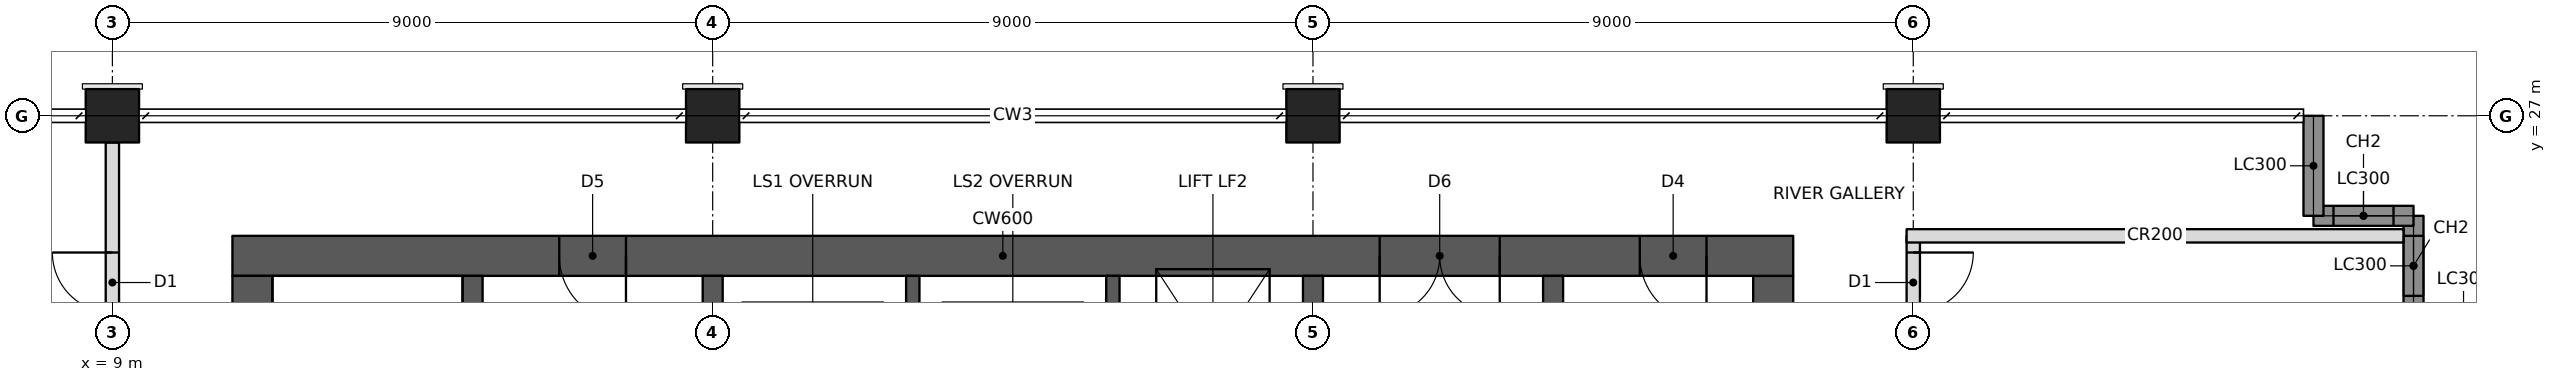
"""IFC4 building model, lengths in metres.
Left out: names, types, materials, properties, quantities, classifications, styles, units other than length and angle.
Written with IfcOpenShell. Run it as: python <this file> out.ifc"""

import sys

from ifc_helpers import new_model, si_unit, direction, frame, frame_2d, origin, origin_2d, place, context, subcontext, project, spatial, rectangle, hollow_rectangle, extrude, element, fill, save


model = new_model("IFC4")
c1 = context("Model", 3, precision=1e-05, world=origin(), true_north=direction((0.0, 1.0)))
c2 = subcontext(c1, "Body", "Model", "MODEL_VIEW")
j1 = project(units=[si_unit("LENGTHUNIT", "METRE"), si_unit("PLANEANGLEUNIT", "RADIAN")], contexts=[c1])
p1 = place(None, origin())
s1 = spatial("IfcSite", under=j1, at=p1, CompositionType="ELEMENT")
p2 = place(p1, origin())
s2 = spatial("IfcBuilding", under=s1, at=p2, CompositionType="ELEMENT")
p3 = place(p2, frame((0.0, 0.0, 163.8)))
s3 = spatial("IfcBuildingStorey", under=s2, at=p3, CompositionType="ELEMENT", Elevation=163.8)
for number, where, z_axis, x_axis in (
    (1, (9.0, 27.0, 0.0), (0.0, 0.0, 1.0), (1.0, 0.0, 0.0)),
    (2, (18.0, 27.0, 0.0), (0.0, 0.0, 1.0), (1.0, 0.0, 0.0)),
    (3, (27.0, 27.0, 0.0), (0.0, 0.0, 1.0), (1.0, 0.0, 0.0)),
    (4, (36.0, 27.0, 0.0), (0.0, 0.0, 1.0), (1.0, 0.0, 0.0)),
):
    element("IfcColumn", number, at=place(p3, frame(where, z_axis=z_axis, x_axis=x_axis)), inside=s3, PredefinedType="COLUMN", context=c2, shape_type="SweptSolid", body=[
        extrude(hollow_rectangle(XDim=0.8, YDim=0.8, WallThickness=0.07, at=origin_2d()), origin(), (0.0, 0.0, 1.0), 3.4),
    ])
p4 = place(p3, frame((10.8, 24.9, 0.0), z_axis=(0.0, 0.0, 1.0), x_axis=(1.0, 0.0, 0.0)))
e5 = element("IfcWall", 5, at=p4, inside=s3, PredefinedType="SHEAR", context=c2, shape_type="SweptSolid", body=[
    extrude(rectangle(XDim=23.4, YDim=0.6, at=frame_2d((11.7, 0.0))), origin(), (0.0, 0.0, 1.0), 3.4),
])
p5 = place(p4, frame((17.2, 0.0, 0.0)))
e6 = element("IfcOpeningElement", 6, at=p5, cuts=e5, PredefinedType="OPENING", context=c2, shape_type="SweptSolid", body=[
    extrude(rectangle(XDim=1.8, YDim=2.1, at=frame_2d((0.9, 1.05))), frame((0.0, 0.31, 0.0), z_axis=(0.0, -1.0, 0.0), x_axis=(1.0, 0.0, 0.0)), (0.0, 0.0, 1.0), 0.62),
])
p6 = place(p4, frame((21.1, 0.0, 0.0)))
e7 = element("IfcOpeningElement", 7, at=p6, cuts=e5, PredefinedType="OPENING", context=c2, shape_type="SweptSolid", body=[
    extrude(rectangle(XDim=1.0, YDim=2.1, at=frame_2d((0.5, 1.05))), frame((0.0, 0.31, 0.0), z_axis=(0.0, -1.0, 0.0), x_axis=(1.0, 0.0, 0.0)), (0.0, 0.0, 1.0), 0.62),
])
p7 = place(p4, frame((4.9, 0.0, 0.0)))
e8 = element("IfcOpeningElement", 8, at=p7, cuts=e5, PredefinedType="OPENING", context=c2, shape_type="SweptSolid", body=[
    extrude(rectangle(XDim=1.0, YDim=2.1, at=frame_2d((0.5, 1.05))), frame((0.0, 0.31, 0.0), z_axis=(0.0, -1.0, 0.0), x_axis=(1.0, 0.0, 0.0)), (0.0, 0.0, 1.0), 0.62),
])
for number, where, z_axis, x_axis in (
    (9, (11.1, 11.4, 0.0), (0.0, 0.0, 1.0), (0.0, 1.0, 0.0)),
    (10, (33.9, 11.4, 0.0), (0.0, 0.0, 1.0), (0.0, 1.0, 0.0)),
):
    element("IfcWall", number, at=place(p3, frame(where, z_axis=z_axis, x_axis=x_axis)), inside=s3, PredefinedType="SHEAR", context=c2, shape_type="SweptSolid", body=[
        extrude(rectangle(XDim=13.2, YDim=0.6, at=frame_2d((6.6, 0.0))), origin(), (0.0, 0.0, 1.0), 3.4),
    ])
p8 = place(p3, frame((14.4, 11.4, 0.0), z_axis=(0.0, 0.0, 1.0), x_axis=(0.0, 1.0, 0.0)))
e11 = element("IfcWall", 11, at=p8, inside=s3, PredefinedType="SHEAR", context=c2, shape_type="SweptSolid", body=[
    extrude(rectangle(XDim=13.2, YDim=0.3, at=frame_2d((6.6, 0.0))), origin(), (0.0, 0.0, 1.0), 3.4),
])
p9 = place(p3, frame((18.0, 11.4, 0.0), z_axis=(0.0, 0.0, 1.0), x_axis=(0.0, 1.0, 0.0)))
e12 = element("IfcWall", 12, at=p9, inside=s3, PredefinedType="SHEAR", context=c2, shape_type="SweptSolid", body=[
    extrude(rectangle(XDim=13.2, YDim=0.3, at=frame_2d((6.6, 0.0))), origin(), (0.0, 0.0, 1.0), 3.4),
])
p10 = place(p9, frame((3.6, 0.0, 0.0)))
e13 = element("IfcOpeningElement", 13, at=p10, cuts=e12, PredefinedType="OPENING", context=c2, shape_type="SweptSolid", body=[
    extrude(rectangle(XDim=1.0, YDim=2.1, at=frame_2d((0.5, 1.05))), frame((0.0, 0.16, 0.0), z_axis=(0.0, -1.0, 0.0), x_axis=(1.0, 0.0, 0.0)), (0.0, 0.0, 1.0), 0.32),
])
p11 = place(p9, frame((7.85, 0.0, 0.0)))
e14 = element("IfcOpeningElement", 14, at=p11, cuts=e12, PredefinedType="OPENING", context=c2, shape_type="SweptSolid", body=[
    extrude(rectangle(XDim=1.1, YDim=2.1, at=frame_2d((0.55, 1.05))), frame((0.0, 0.16, 0.0), z_axis=(0.0, -1.0, 0.0), x_axis=(1.0, 0.0, 0.0)), (0.0, 0.0, 1.0), 0.32),
])
p12 = place(p3, frame((27.0, 21.75, 0.0), z_axis=(0.0, 0.0, 1.0), x_axis=(0.0, 1.0, 0.0)))
e15 = element("IfcWall", 15, at=p12, inside=s3, PredefinedType="SHEAR", context=c2, shape_type="SweptSolid", body=[
    extrude(rectangle(XDim=2.85, YDim=0.3, at=frame_2d((1.425, 0.0))), origin(), (0.0, 0.0, 1.0), 3.4),
])
for number, where, z_axis, x_axis in (
    (16, (21.0, 21.75, 0.0), (0.0, 0.0, 1.0), (0.0, 1.0, 0.0)),
    (17, (24.0, 21.75, 0.0), (0.0, 0.0, 1.0), (0.0, 1.0, 0.0)),
):
    element("IfcWall", number, at=place(p3, frame(where, z_axis=z_axis, x_axis=x_axis)), inside=s3, PredefinedType="SHEAR", context=c2, shape_type="SweptSolid", body=[
        extrude(rectangle(XDim=2.85, YDim=0.2, at=frame_2d((1.425, 0.0))), origin(), (0.0, 0.0, 1.0), 3.4),
    ])
p13 = place(p3, frame((30.6, 11.4, 0.0), z_axis=(0.0, 0.0, 1.0), x_axis=(0.0, 1.0, 0.0)))
e18 = element("IfcWall", 18, at=p13, inside=s3, PredefinedType="SHEAR", context=c2, shape_type="SweptSolid", body=[
    extrude(rectangle(XDim=13.2, YDim=0.3, at=frame_2d((6.6, 0.0))), origin(), (0.0, 0.0, 1.0), 3.4),
])
p14 = place(p3, frame((43.5, 24.0, 0.0), z_axis=(0.0, 0.0, 1.0), x_axis=(0.0, 1.0, 0.0)))
e19 = element("IfcWall", 19, at=p14, inside=s3, PredefinedType="SOLIDWALL", context=c2, shape_type="SweptSolid", body=[
    extrude(rectangle(XDim=1.5, YDim=0.3, at=frame_2d((0.75, 0.0))), origin(), (0.0, 0.0, 1.0), 3.2),
])
p15 = place(p14, frame((0.3, 0.0, 0.6)))
e20 = element("IfcOpeningElement", 20, at=p15, cuts=e19, PredefinedType="OPENING", context=c2, shape_type="SweptSolid", body=[
    extrude(rectangle(XDim=0.9, YDim=2.2, at=frame_2d((0.45, 1.1))), frame((0.0, 0.16, 0.0), z_axis=(0.0, -1.0, 0.0), x_axis=(1.0, 0.0, 0.0)), (0.0, 0.0, 1.0), 0.32),
])
p16 = place(p3, frame((43.5, 25.5, 0.0), z_axis=(0.0, 0.0, 1.0), x_axis=(-1.0, 0.0, 0.0)))
e21 = element("IfcWall", 21, at=p16, inside=s3, PredefinedType="SOLIDWALL", context=c2, shape_type="SweptSolid", body=[
    extrude(rectangle(XDim=1.5, YDim=0.3, at=frame_2d((0.75, 0.0))), origin(), (0.0, 0.0, 1.0), 3.2),
])
p17 = place(p16, frame((0.3, 0.0, 0.6)))
e22 = element("IfcOpeningElement", 22, at=p17, cuts=e21, PredefinedType="OPENING", context=c2, shape_type="SweptSolid", body=[
    extrude(rectangle(XDim=0.9, YDim=2.2, at=frame_2d((0.45, 1.1))), frame((0.0, 0.16, 0.0), z_axis=(0.0, -1.0, 0.0), x_axis=(1.0, 0.0, 0.0)), (0.0, 0.0, 1.0), 0.32),
])
p18 = place(p3, frame((42.0, 25.5, 0.0), z_axis=(0.0, 0.0, 1.0), x_axis=(0.0, 1.0, 0.0)))
e23 = element("IfcWall", 23, at=p18, inside=s3, PredefinedType="SOLIDWALL", context=c2, shape_type="SweptSolid", body=[
    extrude(rectangle(XDim=1.5, YDim=0.3, at=frame_2d((0.75, 0.0))), origin(), (0.0, 0.0, 1.0), 2.42),
])
p19 = place(p3, frame((9.0, 18.5, 0.0), z_axis=(0.0, 0.0, 1.0), x_axis=(0.0, 1.0, 0.0)))
e24 = element("IfcWall", 24, at=p19, inside=s3, PredefinedType="PARTITIONING", context=c2, shape_type="SweptSolid", body=[
    extrude(rectangle(XDim=8.1, YDim=0.2, at=frame_2d((4.05, 0.0))), origin(), (0.0, 0.0, 1.0), 2.405),
])
p20 = place(p19, frame((5.55, 0.0, 0.0)))
e25 = element("IfcOpeningElement", 25, at=p20, cuts=e24, PredefinedType="OPENING", context=c2, shape_type="SweptSolid", body=[
    extrude(rectangle(XDim=0.9, YDim=2.1, at=frame_2d((0.45, 1.05))), frame((0.0, 0.11, 0.0), z_axis=(0.0, -1.0, 0.0), x_axis=(1.0, 0.0, 0.0)), (0.0, 0.0, 1.0), 0.22),
])
p21 = place(p3, frame((36.0, 18.5, 0.0), z_axis=(0.0, 0.0, 1.0), x_axis=(0.0, 1.0, 0.0)))
e26 = element("IfcWall", 26, at=p21, inside=s3, PredefinedType="PARTITIONING", context=c2, shape_type="SweptSolid", body=[
    extrude(rectangle(XDim=6.7, YDim=0.2, at=frame_2d((3.35, 0.0))), origin(), (0.0, 0.0, 1.0), 2.405),
])
p22 = place(p21, frame((5.55, 0.0, 0.0)))
e27 = element("IfcOpeningElement", 27, at=p22, cuts=e26, PredefinedType="OPENING", context=c2, shape_type="SweptSolid", body=[
    extrude(rectangle(XDim=0.9, YDim=2.1, at=frame_2d((0.45, 1.05))), frame((0.0, 0.11, 0.0), z_axis=(0.0, -1.0, 0.0), x_axis=(1.0, 0.0, 0.0)), (0.0, 0.0, 1.0), 0.22),
])
p23 = place(p3, frame((35.9, 25.2, 0.0), z_axis=(0.0, 0.0, 1.0), x_axis=(1.0, 0.0, 0.0)))
e28 = element("IfcWall", 28, at=p23, inside=s3, PredefinedType="PARTITIONING", context=c2, shape_type="SweptSolid", body=[
    extrude(rectangle(XDim=7.45, YDim=0.2, at=frame_2d((3.725, 0.0))), origin(), (0.0, 0.0, 1.0), 2.404),
])
p24 = place(p15, origin())
e29 = element("IfcWindow", 29, at=p24, inside=s3, PartitioningType="SINGLE_PANEL", PredefinedType="WINDOW", context=c2, shape_type="SweptSolid", body=[
    extrude(rectangle(XDim=0.9, YDim=2.2, at=frame_2d((0.45, 1.1))), frame((0.0, 0.03, 0.0), z_axis=(0.0, -1.0, 0.0), x_axis=(1.0, 0.0, 0.0)), (0.0, 0.0, 1.0), 0.06),
])
fill(e20, e29)
p25 = place(p17, origin())
e30 = element("IfcWindow", 30, at=p25, inside=s3, PartitioningType="SINGLE_PANEL", PredefinedType="WINDOW", context=c2, shape_type="SweptSolid", body=[
    extrude(rectangle(XDim=0.9, YDim=2.2, at=frame_2d((0.45, 1.1))), frame((0.0, 0.03, 0.0), z_axis=(0.0, -1.0, 0.0), x_axis=(1.0, 0.0, 0.0)), (0.0, 0.0, 1.0), 0.06),
])
fill(e22, e30)
p26 = place(p20, origin())
e31 = element("IfcDoor", 31, at=p26, inside=s3, OperationType="SINGLE_SWING_RIGHT", PredefinedType="DOOR", context=c2, shape_type="SweptSolid", body=[
    extrude(rectangle(XDim=0.9, YDim=2.1, at=frame_2d((0.45, 1.05))), frame((0.0, 0.025, 0.0), z_axis=(0.0, -1.0, 0.0), x_axis=(1.0, 0.0, 0.0)), (0.0, 0.0, 1.0), 0.05),
])
fill(e25, e31)
p27 = place(p22, frame((0.9, 0.0, 0.0), z_axis=(0.0, 0.0, 1.0), x_axis=(-1.0, 0.0, 0.0)))
e32 = element("IfcDoor", 32, at=p27, inside=s3, OperationType="SINGLE_SWING_LEFT", PredefinedType="DOOR", context=c2, shape_type="SweptSolid", body=[
    extrude(rectangle(XDim=0.9, YDim=2.1, at=frame_2d((0.45, 1.05))), frame((0.0, 0.025, 0.0), z_axis=(0.0, -1.0, 0.0), x_axis=(1.0, 0.0, 0.0)), (0.0, 0.0, 1.0), 0.05),
])
fill(e27, e32)
p28 = place(p5, frame((1.8, 0.0, 0.0), z_axis=(0.0, 0.0, 1.0), x_axis=(-1.0, 0.0, 0.0)))
e33 = element("IfcDoor", 33, at=p28, inside=s3, OperationType="DOUBLE_DOOR_SINGLE_SWING", PredefinedType="DOOR", context=c2, shape_type="SweptSolid", body=[
    extrude(rectangle(XDim=1.8, YDim=2.1, at=frame_2d((0.9, 1.05))), frame((0.0, 0.025, 0.0), z_axis=(0.0, -1.0, 0.0), x_axis=(1.0, 0.0, 0.0)), (0.0, 0.0, 1.0), 0.05),
])
fill(e6, e33)
p29 = place(p6, frame((1.0, 0.0, 0.0), z_axis=(0.0, 0.0, 1.0), x_axis=(-1.0, 0.0, 0.0)))
e34 = element("IfcDoor", 34, at=p29, inside=s3, OperationType="SINGLE_SWING_LEFT", PredefinedType="DOOR", context=c2, shape_type="SweptSolid", body=[
    extrude(rectangle(XDim=1.0, YDim=2.1, at=frame_2d((0.5, 1.05))), frame((0.0, 0.025, 0.0), z_axis=(0.0, -1.0, 0.0), x_axis=(1.0, 0.0, 0.0)), (0.0, 0.0, 1.0), 0.05),
])
fill(e7, e34)
p30 = place(p7, frame((1.0, 0.0, 0.0), z_axis=(0.0, 0.0, 1.0), x_axis=(-1.0, 0.0, 0.0)))
e35 = element("IfcDoor", 35, at=p30, inside=s3, OperationType="SINGLE_SWING_LEFT", PredefinedType="DOOR", context=c2, shape_type="SweptSolid", body=[
    extrude(rectangle(XDim=1.0, YDim=2.1, at=frame_2d((0.5, 1.05))), frame((0.0, 0.025, 0.0), z_axis=(0.0, -1.0, 0.0), x_axis=(1.0, 0.0, 0.0)), (0.0, 0.0, 1.0), 0.05),
])
fill(e8, e35)
save(model, sys.argv[1])
